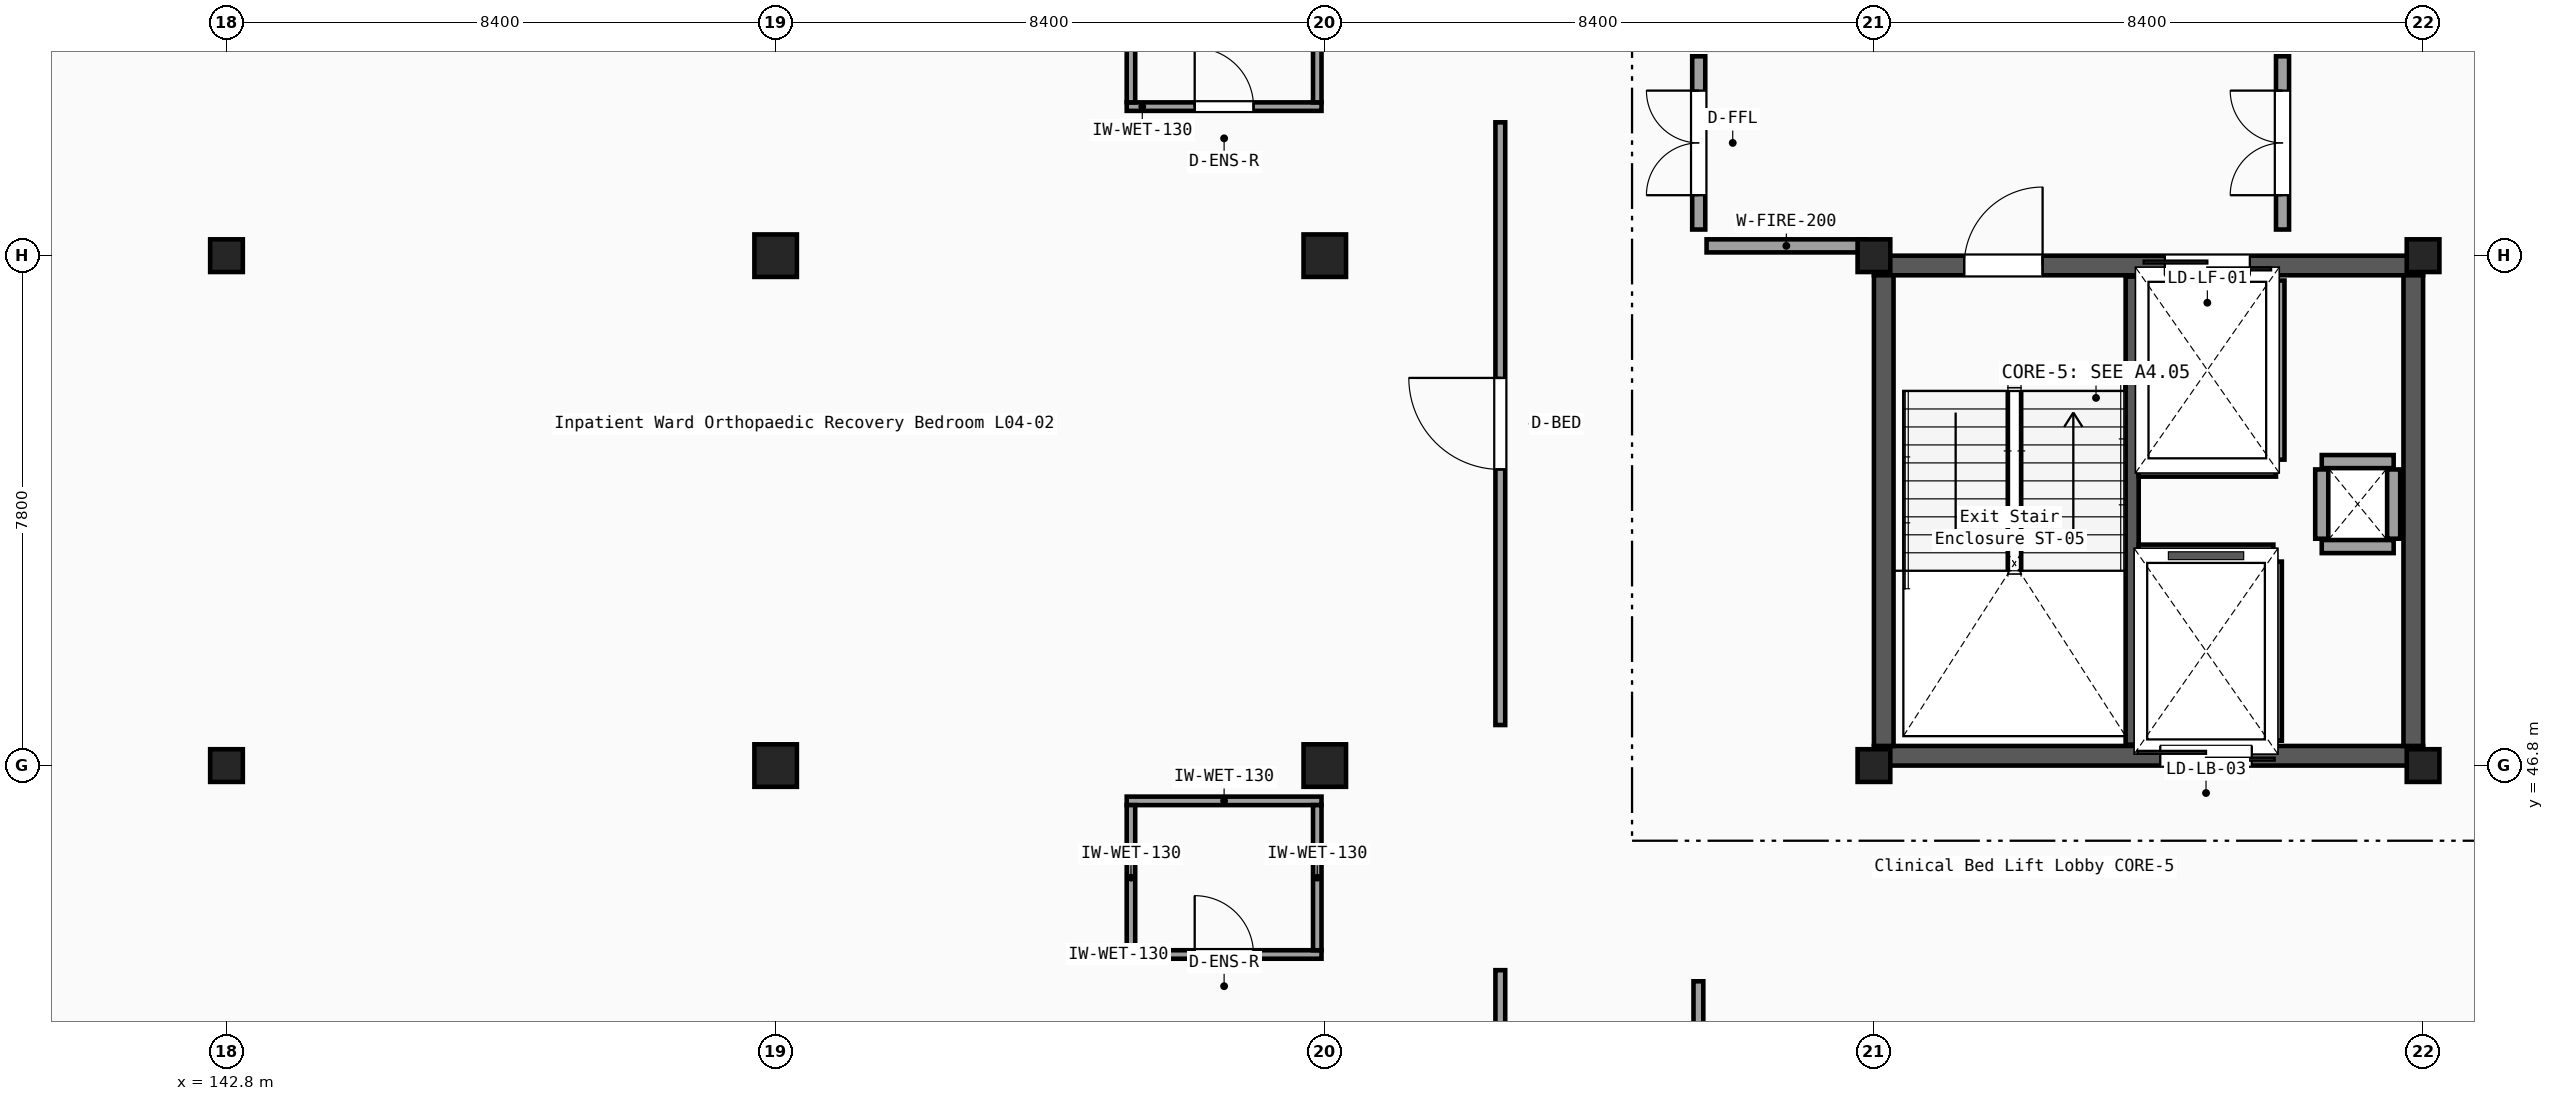
"""IFC4 building model, lengths in metres.
Left out: names, types, materials, properties, quantities, classifications, styles, units other than length and angle.
Written with IfcOpenShell. Run it as: python <this file> out.ifc"""

import sys

from ifc_helpers import new_model, si_unit, direction, frame, frame_2d, origin, origin_2d, place, context, subcontext, project, spatial, rectangle, i_section, extrude, element, fill, save


model = new_model("IFC4")
c1 = context("Model", 3, precision=1e-05, world=origin(), true_north=direction((0.0, 1.0)))
c2 = subcontext(c1, "Body", "Model", "MODEL_VIEW")
j1 = project(units=[si_unit("LENGTHUNIT", "METRE"), si_unit("PLANEANGLEUNIT", "RADIAN")], contexts=[c1])
p1 = place(None, origin())
s1 = spatial("IfcSite", under=j1, at=p1, CompositionType="ELEMENT")
p2 = place(p1, origin())
s2 = spatial("IfcBuilding", under=s1, at=p2, CompositionType="ELEMENT")
p3 = place(p2, frame((0.0, 0.0, 18.9)))
s3 = spatial("IfcBuildingStorey", under=s2, at=p3, CompositionType="ELEMENT", Elevation=18.9)
for number, where, z_axis, x_axis in (
    (1, (142.8, 46.8, 0.0), (0.0, 0.0, 1.0), (1.0, 0.0, 0.0)),
    (2, (142.8, 54.6, 0.0), (0.0, 0.0, 1.0), (1.0, 0.0, 0.0)),
):
    element("IfcColumn", number, at=place(p3, frame(where, z_axis=z_axis, x_axis=x_axis)), inside=s3, PredefinedType="COLUMN", context=c2, shape_type="SweptSolid", body=[
        extrude(i_section(OverallWidth=0.3, OverallDepth=0.5, WebThickness=0.014, FlangeThickness=0.028, FilletRadius=0.027, at=origin_2d()), origin(), (0.0, 0.0, 1.0), 4.05),
    ])
for number, where, z_axis, x_axis in (
    (3, (151.2, 46.8, 0.0), (0.0, 0.0, 1.0), (1.0, 0.0, 0.0)),
    (4, (151.2, 54.6, 0.0), (0.0, 0.0, 1.0), (1.0, 0.0, 0.0)),
    (5, (159.6, 46.8, 0.0), (0.0, 0.0, 1.0), (1.0, 0.0, 0.0)),
    (6, (159.6, 54.6, 0.0), (0.0, 0.0, 1.0), (1.0, 0.0, 0.0)),
):
    element("IfcColumn", number, at=place(p3, frame(where, z_axis=z_axis, x_axis=x_axis)), inside=s3, PredefinedType="COLUMN", context=c2, shape_type="SweptSolid", body=[
        extrude(rectangle(XDim=0.65, YDim=0.65, at=origin_2d()), origin(), (0.0, 0.0, 1.0), 4.05),
    ])
for number, where, z_axis, x_axis in (
    (7, (168.0, 46.8, 0.0), (0.0, 0.0, 1.0), (1.0, 0.0, 0.0)),
    (8, (168.0, 54.6, 0.0), (0.0, 0.0, 1.0), (1.0, 0.0, 0.0)),
    (9, (176.4, 46.8, 0.0), (0.0, 0.0, 1.0), (1.0, 0.0, 0.0)),
    (10, (176.4, 54.6, 0.0), (0.0, 0.0, 1.0), (1.0, 0.0, 0.0)),
):
    element("IfcColumn", number, at=place(p3, frame(where, z_axis=z_axis, x_axis=x_axis)), inside=s3, PredefinedType="COLUMN", context=c2, shape_type="SweptSolid", body=[
        extrude(i_section(OverallWidth=0.3, OverallDepth=0.5, WebThickness=0.014, FlangeThickness=0.028, FilletRadius=0.027, at=origin_2d()), origin(), (0.0, 0.0, 1.0), 4.05),
    ])
p4 = place(p3, frame((168.0, 46.95, 0.0), z_axis=(0.0, 0.0, 1.0), x_axis=(1.0, 0.0, 0.0)))
e11 = element("IfcWall", 11, at=p4, inside=s3, PredefinedType="SHEAR", context=c2, shape_type="SweptSolid", body=[
    extrude(rectangle(XDim=8.4, YDim=0.3, at=frame_2d((4.2, 0.0))), origin(), (0.0, 0.0, 1.0), 3.82),
])
p5 = place(p4, frame((4.38, 0.0, 0.0)))
e12 = element("IfcOpeningElement", 12, at=p5, cuts=e11, PredefinedType="OPENING", context=c2, shape_type="SweptSolid", body=[
    extrude(rectangle(XDim=1.4, YDim=2.2, at=frame_2d((0.7, 1.1))), frame((0.0, 0.16, 0.0), z_axis=(0.0, -1.0, 0.0), x_axis=(1.0, 0.0, 0.0)), (0.0, 0.0, 1.0), 0.32),
])
p6 = place(p3, frame((168.0, 54.45, 0.0), z_axis=(0.0, 0.0, 1.0), x_axis=(1.0, 0.0, 0.0)))
e13 = element("IfcWall", 13, at=p6, inside=s3, PredefinedType="SHEAR", context=c2, shape_type="SweptSolid", body=[
    extrude(rectangle(XDim=8.4, YDim=0.3, at=frame_2d((4.2, 0.0))), origin(), (0.0, 0.0, 1.0), 3.82),
])
p7 = place(p6, frame((1.38, 0.0, 0.0)))
e14 = element("IfcOpeningElement", 14, at=p7, cuts=e13, PredefinedType="OPENING", context=c2, shape_type="SweptSolid", body=[
    extrude(rectangle(XDim=1.2, YDim=2.15, at=frame_2d((0.6, 1.075))), frame((0.0, 0.16, 0.0), z_axis=(0.0, -1.0, 0.0), x_axis=(1.0, 0.0, 0.0)), (0.0, 0.0, 1.0), 0.32),
])
p8 = place(p6, frame((4.45, 0.0, 0.0)))
e15 = element("IfcOpeningElement", 15, at=p8, cuts=e13, PredefinedType="OPENING", context=c2, shape_type="SweptSolid", body=[
    extrude(rectangle(XDim=1.3, YDim=2.2, at=frame_2d((0.65, 1.1))), frame((0.0, 0.16, 0.0), z_axis=(0.0, -1.0, 0.0), x_axis=(1.0, 0.0, 0.0)), (0.0, 0.0, 1.0), 0.32),
])
for number, where, z_axis, x_axis in (
    (16, (168.15, 47.1, 0.0), (0.0, 0.0, 1.0), (0.0, 1.0, 0.0)),
    (17, (176.25, 47.1, 0.0), (0.0, 0.0, 1.0), (0.0, 1.0, 0.0)),
):
    element("IfcWall", number, at=place(p3, frame(where, z_axis=z_axis, x_axis=x_axis)), inside=s3, PredefinedType="SHEAR", context=c2, shape_type="SweptSolid", body=[
        extrude(rectangle(XDim=7.2, YDim=0.3, at=frame_2d((3.6, 0.0))), origin(), (0.0, 0.0, 1.0), 3.82),
    ])
p9 = place(p3, frame((171.95, 47.12, 0.0), z_axis=(0.0, 0.0, 1.0), x_axis=(0.0, 1.0, 0.0)))
e18 = element("IfcWall", 18, at=p9, inside=s3, PredefinedType="SHEAR", context=c2, shape_type="SweptSolid", body=[
    extrude(rectangle(XDim=7.16, YDim=0.2, at=frame_2d((3.58, 0.0))), origin(), (0.0, 0.0, 1.0), 3.82),
])
for number, where, z_axis, x_axis in (
    (19, (174.85, 50.15, 0.0), (0.0, 0.0, 1.0), (1.0, 0.0, 0.0)),
    (20, (174.85, 51.45, 0.0), (0.0, 0.0, 1.0), (1.0, 0.0, 0.0)),
):
    element("IfcWall", number, at=place(p3, frame(where, z_axis=z_axis, x_axis=x_axis)), inside=s3, PredefinedType="PARTITIONING", context=c2, shape_type="SweptSolid", body=[
        extrude(rectangle(XDim=1.1, YDim=0.2, at=frame_2d((0.55, 0.0))), origin(), (0.0, 0.0, 1.0), 3.25),
    ])
for number, where, z_axis, x_axis in (
    (21, (174.85, 50.27, 0.0), (0.0, 0.0, 1.0), (0.0, 1.0, 0.0)),
    (22, (175.95, 50.27, 0.0), (0.0, 0.0, 1.0), (0.0, 1.0, 0.0)),
):
    element("IfcWall", number, at=place(p3, frame(where, z_axis=z_axis, x_axis=x_axis)), inside=s3, PredefinedType="PARTITIONING", context=c2, shape_type="SweptSolid", body=[
        extrude(rectangle(XDim=1.06, YDim=0.2, at=frame_2d((0.53, 0.0))), origin(), (0.0, 0.0, 1.0), 3.25),
    ])
p10 = place(p3, frame((174.18, 51.48, 0.0), z_axis=(0.0, 0.0, 1.0), x_axis=(0.0, 1.0, 0.0)))
e23 = element("IfcWall", 23, at=p10, inside=s3, PredefinedType="PARTITIONING", context=c2, shape_type="SweptSolid", body=[
    extrude(rectangle(XDim=2.74, YDim=0.2, at=frame_2d((1.37, 0.0))), origin(), (0.0, 0.0, 1.0), 3.25),
])
p11 = place(p3, frame((172.05, 51.32, 0.0), z_axis=(0.0, 0.0, 1.0), x_axis=(1.0, 0.0, 0.0)))
e24 = element("IfcWall", 24, at=p11, inside=s3, PredefinedType="PARTITIONING", context=c2, shape_type="SweptSolid", body=[
    extrude(rectangle(XDim=2.1, YDim=0.2, at=frame_2d((1.05, 0.0))), origin(), (0.0, 0.0, 1.0), 3.25),
])
p12 = place(p3, frame((174.14, 47.18, 0.0), z_axis=(0.0, 0.0, 1.0), x_axis=(0.0, 1.0, 0.0)))
e25 = element("IfcWall", 25, at=p12, inside=s3, PredefinedType="PARTITIONING", context=c2, shape_type="SweptSolid", body=[
    extrude(rectangle(XDim=2.74, YDim=0.2, at=frame_2d((1.37, 0.0))), origin(), (0.0, 0.0, 1.0), 3.25),
])
p13 = place(p3, frame((172.05, 50.08, 0.0), z_axis=(0.0, 0.0, 1.0), x_axis=(1.0, 0.0, 0.0)))
e26 = element("IfcWall", 26, at=p13, inside=s3, PredefinedType="PARTITIONING", context=c2, shape_type="SweptSolid", body=[
    extrude(rectangle(XDim=2.06, YDim=0.2, at=frame_2d((1.03, 0.0))), origin(), (0.0, 0.0, 1.0), 3.25),
])
p14 = place(p3, frame((165.44, 54.75, 0.0), z_axis=(0.0, 0.0, 1.0), x_axis=(1.0, 0.0, 0.0)))
e27 = element("IfcWall", 27, at=p14, inside=s3, PredefinedType="PARTITIONING", context=c2, shape_type="SweptSolid", body=[
    extrude(rectangle(XDim=2.44, YDim=0.2, at=frame_2d((1.22, 0.0))), origin(), (0.0, 0.0, 1.0), 3.25),
])
p15 = place(p3, frame((165.32, 55.0, 0.0), z_axis=(0.0, 0.0, 1.0), x_axis=(0.0, 1.0, 0.0)))
e28 = element("IfcWall", 28, at=p15, inside=s3, PredefinedType="PARTITIONING", context=c2, shape_type="SweptSolid", body=[
    extrude(rectangle(XDim=2.65, YDim=0.2, at=frame_2d((1.325, 0.0))), origin(), (0.0, 0.0, 1.0), 3.25),
])
p16 = place(p15, frame((0.525, 0.0, 0.0)))
e29 = element("IfcOpeningElement", 29, at=p16, cuts=e28, PredefinedType="OPENING", context=c2, shape_type="SweptSolid", body=[
    extrude(rectangle(XDim=1.6, YDim=2.2, at=frame_2d((0.8, 1.1))), frame((0.0, 0.11, 0.0), z_axis=(0.0, -1.0, 0.0), x_axis=(1.0, 0.0, 0.0)), (0.0, 0.0, 1.0), 0.22),
])
p17 = place(p3, frame((174.25, 55.0, 0.0), z_axis=(0.0, 0.0, 1.0), x_axis=(0.0, 1.0, 0.0)))
e30 = element("IfcWall", 30, at=p17, inside=s3, PredefinedType="PARTITIONING", context=c2, shape_type="SweptSolid", body=[
    extrude(rectangle(XDim=2.65, YDim=0.2, at=frame_2d((1.325, 0.0))), origin(), (0.0, 0.0, 1.0), 3.25),
])
p18 = place(p17, frame((0.525, 0.0, 0.0)))
e31 = element("IfcOpeningElement", 31, at=p18, cuts=e30, PredefinedType="OPENING", context=c2, shape_type="SweptSolid", body=[
    extrude(rectangle(XDim=1.6, YDim=2.2, at=frame_2d((0.8, 1.1))), frame((0.0, 0.11, 0.0), z_axis=(0.0, -1.0, 0.0), x_axis=(1.0, 0.0, 0.0)), (0.0, 0.0, 1.0), 0.22),
])
p19 = place(p3, frame((162.285, 39.62, 0.0), z_axis=(0.0, 0.0, 1.0), x_axis=(0.0, 1.0, 0.0)))
e32 = element("IfcWall", 32, at=p19, inside=s3, PredefinedType="PARTITIONING", context=c2, shape_type="SweptSolid", body=[
    extrude(rectangle(XDim=4.05, YDim=0.15, at=frame_2d((2.025, 0.0))), origin(), (0.0, 0.0, 1.0), 3.77),
])
p20 = place(p19, frame((1.325, 0.0, 0.0)))
e33 = element("IfcOpeningElement", 33, at=p20, cuts=e32, PredefinedType="OPENING", context=c2, shape_type="SweptSolid", body=[
    extrude(rectangle(XDim=1.4, YDim=2.2, at=frame_2d((0.7, 1.1))), frame((0.0, 0.085, 0.0), z_axis=(0.0, -1.0, 0.0), x_axis=(1.0, 0.0, 0.0)), (0.0, 0.0, 1.0), 0.17),
])
p21 = place(p3, frame((156.57, 43.91, 0.0), z_axis=(0.0, 0.0, 1.0), x_axis=(1.0, 0.0, 0.0)))
e34 = element("IfcWall", 34, at=p21, inside=s3, PredefinedType="PARTITIONING", context=c2, shape_type="SweptSolid", body=[
    extrude(rectangle(XDim=2.98, YDim=0.13, at=frame_2d((1.49, 0.0))), origin(), (0.0, 0.0, 1.0), 3.53),
])
p22 = place(p21, frame((1.04, 0.0, 0.0)))
e35 = element("IfcOpeningElement", 35, at=p22, cuts=e34, PredefinedType="OPENING", context=c2, shape_type="SweptSolid", body=[
    extrude(rectangle(XDim=0.9, YDim=2.1, at=frame_2d((0.45, 1.05))), frame((0.0, 0.075, 0.0), z_axis=(0.0, -1.0, 0.0), x_axis=(1.0, 0.0, 0.0)), (0.0, 0.0, 1.0), 0.15),
])
p23 = place(p3, frame((156.57, 46.26, 0.0), z_axis=(0.0, 0.0, 1.0), x_axis=(1.0, 0.0, 0.0)))
e36 = element("IfcWall", 36, at=p23, inside=s3, PredefinedType="PARTITIONING", context=c2, shape_type="SweptSolid", body=[
    extrude(rectangle(XDim=2.98, YDim=0.13, at=frame_2d((1.49, 0.0))), origin(), (0.0, 0.0, 1.0), 3.53),
])
p24 = place(p3, frame((156.635, 43.975, 0.0), z_axis=(0.0, 0.0, 1.0), x_axis=(0.0, 1.0, 0.0)))
e37 = element("IfcWall", 37, at=p24, inside=s3, PredefinedType="PARTITIONING", context=c2, shape_type="SweptSolid", body=[
    extrude(rectangle(XDim=2.22, YDim=0.13, at=frame_2d((1.11, 0.0))), origin(), (0.0, 0.0, 1.0), 3.77),
])
p25 = place(p3, frame((159.485, 43.975, 0.0), z_axis=(0.0, 0.0, 1.0), x_axis=(0.0, 1.0, 0.0)))
e38 = element("IfcWall", 38, at=p25, inside=s3, PredefinedType="PARTITIONING", context=c2, shape_type="SweptSolid", body=[
    extrude(rectangle(XDim=2.22, YDim=0.13, at=frame_2d((1.11, 0.0))), origin(), (0.0, 0.0, 1.0), 3.53),
])
p26 = place(p3, frame((162.285, 47.42, 0.0), z_axis=(0.0, 0.0, 1.0), x_axis=(0.0, 1.0, 0.0)))
e39 = element("IfcWall", 39, at=p26, inside=s3, PredefinedType="PARTITIONING", context=c2, shape_type="SweptSolid", body=[
    extrude(rectangle(XDim=9.22, YDim=0.15, at=frame_2d((4.61, 0.0))), origin(), (0.0, 0.0, 1.0), 3.25),
])
p27 = place(p26, frame((3.91, 0.0, 0.0)))
e40 = element("IfcOpeningElement", 40, at=p27, cuts=e39, PredefinedType="OPENING", context=c2, shape_type="SweptSolid", body=[
    extrude(rectangle(XDim=1.4, YDim=2.2, at=frame_2d((0.7, 1.1))), frame((0.0, 0.085, 0.0), z_axis=(0.0, -1.0, 0.0), x_axis=(1.0, 0.0, 0.0)), (0.0, 0.0, 1.0), 0.17),
])
p28 = place(p3, frame((156.57, 56.88, 0.0), z_axis=(0.0, 0.0, 1.0), x_axis=(1.0, 0.0, 0.0)))
e41 = element("IfcWall", 41, at=p28, inside=s3, PredefinedType="PARTITIONING", context=c2, shape_type="SweptSolid", body=[
    extrude(rectangle(XDim=2.98, YDim=0.13, at=frame_2d((1.49, 0.0))), origin(), (0.0, 0.0, 1.0), 3.53),
])
p29 = place(p28, frame((1.04, 0.0, 0.0)))
e42 = element("IfcOpeningElement", 42, at=p29, cuts=e41, PredefinedType="OPENING", context=c2, shape_type="SweptSolid", body=[
    extrude(rectangle(XDim=0.9, YDim=2.1, at=frame_2d((0.45, 1.05))), frame((0.0, 0.075, 0.0), z_axis=(0.0, -1.0, 0.0), x_axis=(1.0, 0.0, 0.0)), (0.0, 0.0, 1.0), 0.15),
])
p30 = place(p3, frame((156.635, 56.945, 0.0), z_axis=(0.0, 0.0, 1.0), x_axis=(0.0, 1.0, 0.0)))
e43 = element("IfcWall", 43, at=p30, inside=s3, PredefinedType="PARTITIONING", context=c2, shape_type="SweptSolid", body=[
    extrude(rectangle(XDim=2.22, YDim=0.13, at=frame_2d((1.11, 0.0))), origin(), (0.0, 0.0, 1.0), 3.77),
])
p31 = place(p3, frame((159.485, 56.945, 0.0), z_axis=(0.0, 0.0, 1.0), x_axis=(0.0, 1.0, 0.0)))
e44 = element("IfcWall", 44, at=p31, inside=s3, PredefinedType="PARTITIONING", context=c2, shape_type="SweptSolid", body=[
    extrude(rectangle(XDim=2.22, YDim=0.13, at=frame_2d((1.11, 0.0))), origin(), (0.0, 0.0, 1.0), 3.53),
])
p32 = place(p3, frame((165.315, 39.62, 0.0), z_axis=(0.0, 0.0, 1.0), x_axis=(0.0, 1.0, 0.0)))
e45 = element("IfcWall", 45, at=p32, inside=s3, PredefinedType="PARTITIONING", context=c2, shape_type="SweptSolid", body=[
    extrude(rectangle(XDim=3.88, YDim=0.15, at=frame_2d((1.94, 0.0))), origin(), (0.0, 0.0, 1.0), 3.77),
])
p33 = place(p32, frame((1.24, 0.0, 0.0)))
e46 = element("IfcOpeningElement", 46, at=p33, cuts=e45, PredefinedType="OPENING", context=c2, shape_type="SweptSolid", body=[
    extrude(rectangle(XDim=1.4, YDim=2.2, at=frame_2d((0.7, 1.1))), frame((0.0, 0.085, 0.0), z_axis=(0.0, -1.0, 0.0), x_axis=(1.0, 0.0, 0.0)), (0.0, 0.0, 1.0), 0.17),
])
p34 = place(p7, origin())
e47 = element("IfcDoor", 47, at=p34, inside=s3, OperationType="SINGLE_SWING_RIGHT", PredefinedType="DOOR", context=c2, shape_type="SweptSolid", body=[
    extrude(rectangle(XDim=1.2, YDim=2.15, at=frame_2d((0.6, 1.075))), frame((0.0, 0.025, 0.0), z_axis=(0.0, -1.0, 0.0), x_axis=(1.0, 0.0, 0.0)), (0.0, 0.0, 1.0), 0.05),
])
fill(e14, e47)
p35 = place(p8, origin())
e48 = element("IfcDoor", 48, at=p35, inside=s3, OperationType="DOUBLE_DOOR_SLIDING", PredefinedType="DOOR", context=c2, shape_type="SweptSolid", body=[
    extrude(rectangle(XDim=1.3, YDim=2.2, at=frame_2d((0.65, 1.1))), frame((0.0, 0.025, 0.0), z_axis=(0.0, -1.0, 0.0), x_axis=(1.0, 0.0, 0.0)), (0.0, 0.0, 1.0), 0.05),
])
fill(e15, e48)
p36 = place(p5, origin())
e49 = element("IfcDoor", 49, at=p36, inside=s3, OperationType="DOUBLE_DOOR_SLIDING", PredefinedType="DOOR", context=c2, shape_type="SweptSolid", body=[
    extrude(rectangle(XDim=1.4, YDim=2.2, at=frame_2d((0.7, 1.1))), frame((0.0, 0.025, 0.0), z_axis=(0.0, -1.0, 0.0), x_axis=(1.0, 0.0, 0.0)), (0.0, 0.0, 1.0), 0.05),
])
fill(e12, e49)
p37 = place(p16, origin())
e50 = element("IfcDoor", 50, at=p37, inside=s3, OperationType="DOUBLE_DOOR_SINGLE_SWING", PredefinedType="DOOR", context=c2, shape_type="SweptSolid", body=[
    extrude(rectangle(XDim=1.6, YDim=2.2, at=frame_2d((0.8, 1.1))), frame((0.0, 0.025, 0.0), z_axis=(0.0, -1.0, 0.0), x_axis=(1.0, 0.0, 0.0)), (0.0, 0.0, 1.0), 0.05),
])
fill(e29, e50)
p38 = place(p18, origin())
e51 = element("IfcDoor", 51, at=p38, inside=s3, OperationType="DOUBLE_DOOR_SINGLE_SWING", PredefinedType="DOOR", context=c2, shape_type="SweptSolid", body=[
    extrude(rectangle(XDim=1.6, YDim=2.2, at=frame_2d((0.8, 1.1))), frame((0.0, 0.025, 0.0), z_axis=(0.0, -1.0, 0.0), x_axis=(1.0, 0.0, 0.0)), (0.0, 0.0, 1.0), 0.05),
])
fill(e31, e51)
p39 = place(p22, origin())
e52 = element("IfcDoor", 52, at=p39, inside=s3, OperationType="SINGLE_SWING_LEFT", PredefinedType="DOOR", context=c2, shape_type="SweptSolid", body=[
    extrude(rectangle(XDim=0.9, YDim=2.1, at=frame_2d((0.45, 1.05))), frame((0.0, 0.025, 0.0), z_axis=(0.0, -1.0, 0.0), x_axis=(1.0, 0.0, 0.0)), (0.0, 0.0, 1.0), 0.05),
])
fill(e35, e52)
p40 = place(p27, origin())
e53 = element("IfcDoor", 53, at=p40, inside=s3, OperationType="SINGLE_SWING_RIGHT", PredefinedType="DOOR", context=c2, shape_type="SweptSolid", body=[
    extrude(rectangle(XDim=1.4, YDim=2.2, at=frame_2d((0.7, 1.1))), frame((0.0, 0.025, 0.0), z_axis=(0.0, -1.0, 0.0), x_axis=(1.0, 0.0, 0.0)), (0.0, 0.0, 1.0), 0.05),
])
fill(e40, e53)
p41 = place(p29, origin())
e54 = element("IfcDoor", 54, at=p41, inside=s3, OperationType="SINGLE_SWING_LEFT", PredefinedType="DOOR", context=c2, shape_type="SweptSolid", body=[
    extrude(rectangle(XDim=0.9, YDim=2.1, at=frame_2d((0.45, 1.05))), frame((0.0, 0.025, 0.0), z_axis=(0.0, -1.0, 0.0), x_axis=(1.0, 0.0, 0.0)), (0.0, 0.0, 1.0), 0.05),
])
fill(e42, e54)
save(model, sys.argv[1])
